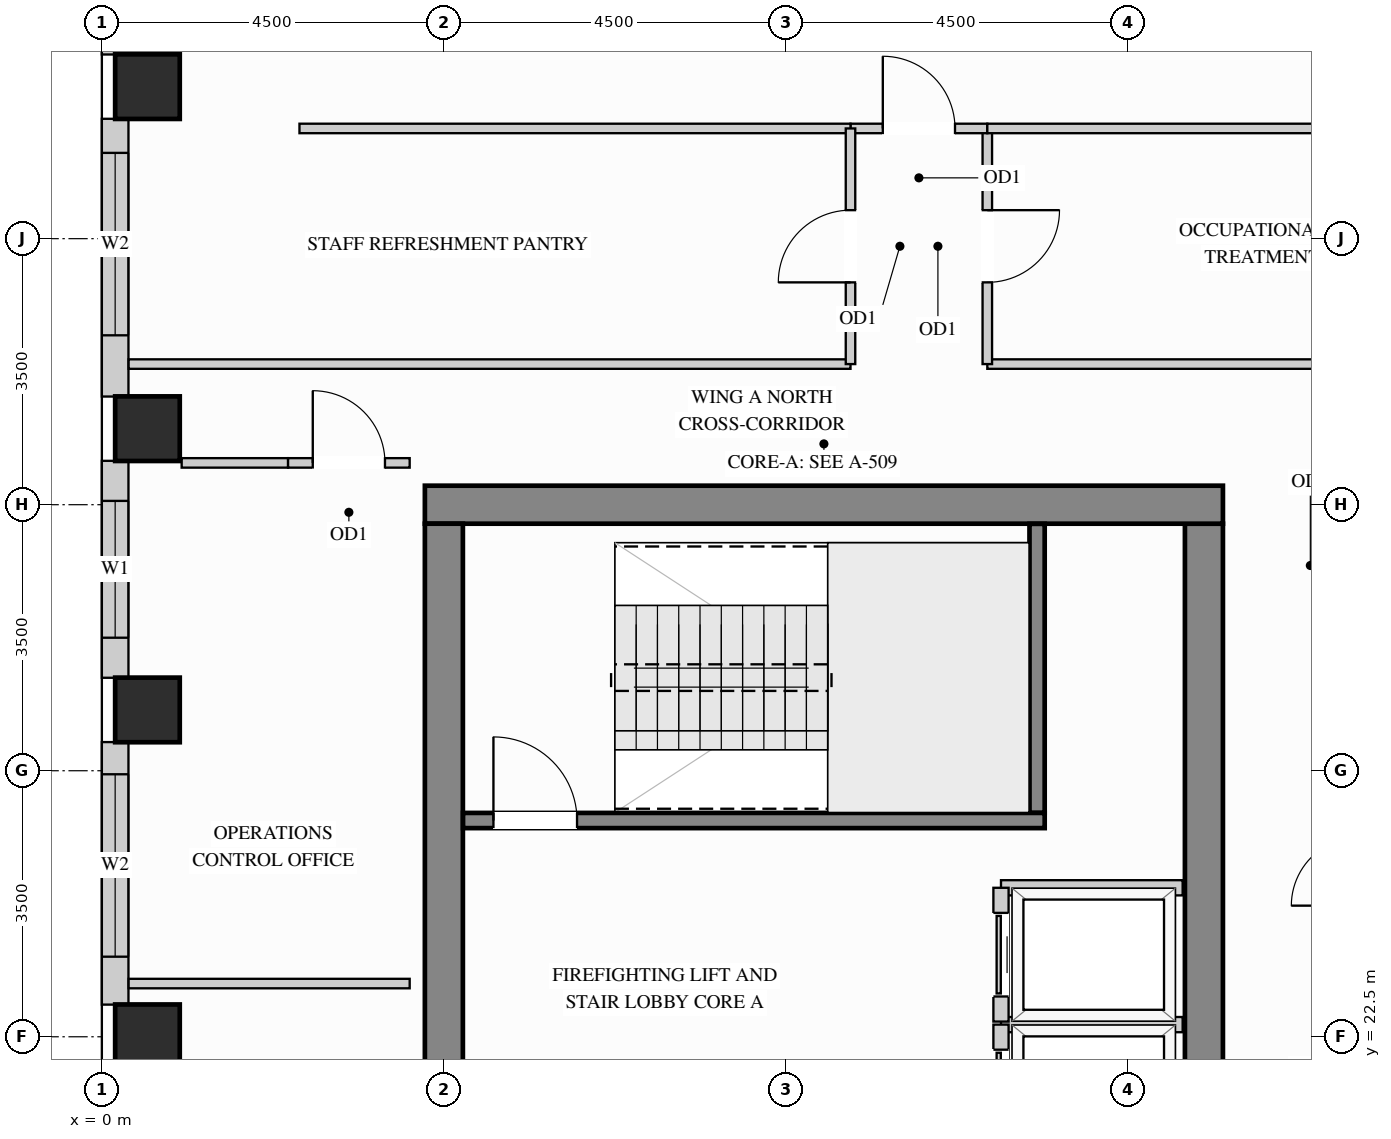
"""IFC4 building model, lengths in metres.
Left out: names, types, materials, properties, quantities, classifications, styles, units other than length and angle.
Written with IfcOpenShell. Run it as: python <this file> out.ifc"""

import sys

from ifc_helpers import new_model, si_unit, direction, frame, frame_2d, origin, origin_2d, place, context, subcontext, project, spatial, rectangle, extrude, source, transform, mapped, element, fill, save


model = new_model("IFC4")
c1 = context("Model", 3, precision=1e-05, world=origin(), true_north=direction((0.0, 1.0)))
c2 = subcontext(c1, "Body", "Model", "MODEL_VIEW")
j1 = project(units=[si_unit("LENGTHUNIT", "METRE"), si_unit("PLANEANGLEUNIT", "RADIAN")], contexts=[c1])
p1 = place(None, origin())
s1 = spatial("IfcSite", under=j1, at=p1, CompositionType="ELEMENT")
p2 = place(p1, origin())
s2 = spatial("IfcBuilding", under=s1, at=p2, CompositionType="ELEMENT")
p3 = place(p2, frame((0.0, 0.0, 226.8)))
s3 = spatial("IfcBuildingStorey", under=s2, at=p3, CompositionType="ELEMENT", Elevation=226.8)
m1 = source(origin(), c2, "Body", "SweptSolid", [
    extrude(rectangle(XDim=0.85, YDim=0.85, at=origin_2d()), origin(), (0.0, 0.0, 1.0), 3.4),
])
for number, where, z_axis, x_axis in (
    (1, (0.6, 22.5, 0.0), (0.0, 0.0, 1.0), (1.0, 0.0, 0.0)),
    (2, (0.6, 26.8, 0.0), (0.0, 0.0, 1.0), (1.0, 0.0, 0.0)),
    (3, (0.6, 30.5, 0.0), (0.0, 0.0, 1.0), (1.0, 0.0, 0.0)),
    (4, (0.6, 35.0, 0.0), (0.0, 0.0, 1.0), (1.0, 0.0, 0.0)),
):
    element("IfcColumn", number, at=place(p3, frame(where, z_axis=z_axis, x_axis=x_axis)), inside=s3, PredefinedType="COLUMN", context=c2, shape_type="MappedRepresentation", body=[
        mapped(m1, transform((0.0, 0.0, 0.0), x_axis=(1.0, 0.0, 0.0), y_axis=(0.0, 1.0, 0.0), z_axis=(0.0, 0.0, 1.0))),
    ])
m2 = source(origin(), c2, "Body", "SweptSolid", [
    extrude(rectangle(XDim=8.37, YDim=0.5, at=frame_2d((4.185, 0.0))), origin(), (0.0, 0.0, 1.0), 3.4),
])
p4 = place(p3, frame((14.5, 20.88, 0.0), z_axis=(0.0, 0.0, 1.0), x_axis=(0.0, 1.0, 0.0)))
e5 = element("IfcWall", 5, at=p4, inside=s3, PredefinedType="SHEAR", context=c2, shape_type="MappedRepresentation", body=[
    mapped(m2, transform((0.0, 0.0, 0.0), x_axis=(1.0, 0.0, 0.0), y_axis=(0.0, 1.0, 0.0), z_axis=(0.0, 0.0, 1.0))),
])
m3 = source(origin(), c2, "Body", "SweptSolid", [
    extrude(rectangle(XDim=10.5, YDim=0.5, at=frame_2d((5.25, 0.0))), origin(), (0.0, 0.0, 1.0), 3.4),
])
p5 = place(p3, frame((4.25, 29.5, 0.0), z_axis=(0.0, 0.0, 1.0), x_axis=(1.0, 0.0, 0.0)))
e6 = element("IfcWall", 6, at=p5, inside=s3, PredefinedType="SHEAR", context=c2, shape_type="MappedRepresentation", body=[
    mapped(m3, transform((0.0, 0.0, 0.0), x_axis=(1.0, 0.0, 0.0), y_axis=(0.0, 1.0, 0.0), z_axis=(0.0, 0.0, 1.0))),
])
m4 = source(origin(), c2, "Body", "SweptSolid", [
    extrude(rectangle(XDim=20.5, YDim=0.5, at=frame_2d((10.25, 0.0))), origin(), (0.0, 0.0, 1.0), 3.4),
])
p6 = place(p3, frame((4.5, 8.75, 0.0), z_axis=(0.0, 0.0, 1.0), x_axis=(0.0, 1.0, 0.0)))
e7 = element("IfcWall", 7, at=p6, inside=s3, PredefinedType="SHEAR", context=c2, shape_type="MappedRepresentation", body=[
    mapped(m4, transform((0.0, 0.0, 0.0), x_axis=(1.0, 0.0, 0.0), y_axis=(0.0, 1.0, 0.0), z_axis=(0.0, 0.0, 1.0))),
])
m5 = source(origin(), c2, "Body", "SweptSolid", [
    extrude(rectangle(XDim=0.229, YDim=0.35, at=frame_2d((0.115, 0.0))), origin(), (0.0, 0.0, 1.0), 3.385),
])
p7 = place(p3, frame((0.175, 35.652, 0.0), z_axis=(0.0, 0.0, 1.0), x_axis=(0.0, -1.0, 0.0)))
e8 = element("IfcWall", 8, at=p7, inside=s3, PredefinedType="SOLIDWALL", context=c2, shape_type="MappedRepresentation", body=[
    mapped(m5, transform((0.0, 0.0, 0.0), x_axis=(1.0, 0.0, 0.0), y_axis=(0.0, 1.0, 0.0), z_axis=(0.0, 0.0, 1.0))),
])
p8 = place(p3, frame((0.175, 34.577, 0.0), z_axis=(0.0, 0.0, 1.0), x_axis=(0.0, -1.0, 0.0)))
e9 = element("IfcWall", 9, at=p8, inside=s3, PredefinedType="SOLIDWALL", context=c2, shape_type="SweptSolid", body=[
    extrude(rectangle(XDim=3.654, YDim=0.35, at=frame_2d((1.827, 0.0))), origin(), (0.0, 0.0, 1.0), 3.385),
])
p9 = place(p8, frame((0.448, 0.0, 0.78)))
e10 = element("IfcOpeningElement", 10, at=p9, cuts=e9, PredefinedType="OPENING", context=c2, shape_type="SweptSolid", body=[
    extrude(rectangle(XDim=2.4, YDim=2.1, at=frame_2d((1.2, 1.05))), frame((0.0, 0.185, 0.0), z_axis=(0.0, -1.0, 0.0), x_axis=(1.0, 0.0, 0.0)), (0.0, 0.0, 1.0), 0.37),
])
p10 = place(p3, frame((0.175, 30.077, 0.0), z_axis=(0.0, 0.0, 1.0), x_axis=(0.0, -1.0, 0.0)))
e11 = element("IfcWall", 11, at=p10, inside=s3, PredefinedType="SOLIDWALL", context=c2, shape_type="SweptSolid", body=[
    extrude(rectangle(XDim=2.854, YDim=0.35, at=frame_2d((1.427, 0.0))), origin(), (0.0, 0.0, 1.0), 3.385),
])
p11 = place(p10, frame((0.527, 0.0, 0.78)))
e12 = element("IfcOpeningElement", 12, at=p11, cuts=e11, PredefinedType="OPENING", context=c2, shape_type="SweptSolid", body=[
    extrude(rectangle(XDim=1.8, YDim=2.1, at=frame_2d((0.9, 1.05))), frame((0.0, 0.185, 0.0), z_axis=(0.0, -1.0, 0.0), x_axis=(1.0, 0.0, 0.0)), (0.0, 0.0, 1.0), 0.37),
])
p12 = place(p3, frame((0.175, 26.377, 0.0), z_axis=(0.0, 0.0, 1.0), x_axis=(0.0, -1.0, 0.0)))
e13 = element("IfcWall", 13, at=p12, inside=s3, PredefinedType="SOLIDWALL", context=c2, shape_type="SweptSolid", body=[
    extrude(rectangle(XDim=3.454, YDim=0.35, at=frame_2d((1.727, 0.0))), origin(), (0.0, 0.0, 1.0), 3.385),
])
p13 = place(p12, frame((0.424, 0.0, 0.78)))
e14 = element("IfcOpeningElement", 14, at=p13, cuts=e13, PredefinedType="OPENING", context=c2, shape_type="SweptSolid", body=[
    extrude(rectangle(XDim=2.4, YDim=2.1, at=frame_2d((1.2, 1.05))), frame((0.0, 0.185, 0.0), z_axis=(0.0, -1.0, 0.0), x_axis=(1.0, 0.0, 0.0)), (0.0, 0.0, 1.0), 0.37),
])
m6 = source(origin(), c2, "Body", "SweptSolid", [
    extrude(rectangle(XDim=7.498, YDim=0.125, at=frame_2d((3.749, 0.0))), origin(), (0.0, 0.0, 1.0), 3.385),
])
p14 = place(p3, frame((11.65, 31.35, 0.0), z_axis=(0.0, 0.0, 1.0), x_axis=(1.0, 0.0, 0.0)))
e15 = element("IfcWall", 15, at=p14, inside=s3, PredefinedType="PARTITIONING", context=c2, shape_type="MappedRepresentation", body=[
    mapped(m6, transform((0.0, 0.0, 0.0), x_axis=(1.0, 0.0, 0.0), y_axis=(0.0, 1.0, 0.0), z_axis=(0.0, 0.0, 1.0))),
])
m7 = source(origin(), c2, "Body", "SweptSolid", [
    extrude(rectangle(XDim=9.498, YDim=0.125, at=frame_2d((4.749, 0.0))), origin(), (0.0, 0.0, 1.0), 3.385),
])
p15 = place(p3, frame((0.352, 31.35, 0.0), z_axis=(0.0, 0.0, 1.0), x_axis=(1.0, 0.0, 0.0)))
e16 = element("IfcWall", 16, at=p15, inside=s3, PredefinedType="PARTITIONING", context=c2, shape_type="MappedRepresentation", body=[
    mapped(m7, transform((0.0, 0.0, 0.0), x_axis=(1.0, 0.0, 0.0), y_axis=(0.0, 1.0, 0.0), z_axis=(0.0, 0.0, 1.0))),
])
m8 = source(origin(), c2, "Body", "SweptSolid", [
    extrude(rectangle(XDim=1.4, YDim=0.125, at=frame_2d((0.7, 0.0))), origin(), (0.0, 0.0, 1.0), 3.385),
])
p16 = place(p3, frame((1.05, 30.05, 0.0), z_axis=(0.0, 0.0, 1.0), x_axis=(1.0, 0.0, 0.0)))
e17 = element("IfcWall", 17, at=p16, inside=s3, PredefinedType="PARTITIONING", context=c2, shape_type="MappedRepresentation", body=[
    mapped(m8, transform((0.0, 0.0, 0.0), x_axis=(1.0, 0.0, 0.0), y_axis=(0.0, 1.0, 0.0), z_axis=(0.0, 0.0, 1.0))),
])
p17 = place(p3, frame((2.45, 30.05, 0.0), z_axis=(0.0, 0.0, 1.0), x_axis=(1.0, 0.0, 0.0)))
e18 = element("IfcWall", 18, at=p17, inside=s3, PredefinedType="PARTITIONING", context=c2, shape_type="SweptSolid", body=[
    extrude(rectangle(XDim=1.6, YDim=0.125, at=frame_2d((0.8, 0.0))), origin(), (0.0, 0.0, 1.0), 3.385),
])
p18 = place(p17, frame((0.325, 0.0, 0.0)))
e19 = element("IfcOpeningElement", 19, at=p18, cuts=e18, PredefinedType="OPENING", context=c2, shape_type="SweptSolid", body=[
    extrude(rectangle(XDim=0.95, YDim=2.15, at=frame_2d((0.475, 1.075))), frame((0.0, 0.073, 0.0), z_axis=(0.0, -1.0, 0.0), x_axis=(1.0, 0.0, 0.0)), (0.0, 0.0, 1.0), 0.145),
])
p19 = place(p3, frame((11.65, 31.35, 0.0), z_axis=(0.0, 0.0, 1.0), x_axis=(0.0, 1.0, 0.0)))
e20 = element("IfcWall", 20, at=p19, inside=s3, PredefinedType="PARTITIONING", context=c2, shape_type="SweptSolid", body=[
    extrude(rectangle(XDim=3.1, YDim=0.125, at=frame_2d((1.55, 0.0))), origin(), (0.0, 0.0, 1.0), 3.385),
])
p20 = place(p19, frame((1.075, 0.0, 0.0)))
e21 = element("IfcOpeningElement", 21, at=p20, cuts=e20, PredefinedType="OPENING", context=c2, shape_type="SweptSolid", body=[
    extrude(rectangle(XDim=0.95, YDim=2.15, at=frame_2d((0.475, 1.075))), frame((0.0, 0.073, 0.0), z_axis=(0.0, -1.0, 0.0), x_axis=(1.0, 0.0, 0.0)), (0.0, 0.0, 1.0), 0.145),
])
p21 = place(p3, frame((9.85, 34.45, 0.0), z_axis=(0.0, 0.0, 1.0), x_axis=(1.0, 0.0, 0.0)))
e22 = element("IfcWall", 22, at=p21, inside=s3, PredefinedType="PARTITIONING", context=c2, shape_type="SweptSolid", body=[
    extrude(rectangle(XDim=1.8, YDim=0.125, at=frame_2d((0.9, 0.0))), origin(), (0.0, 0.0, 1.0), 3.385),
])
p22 = place(p21, frame((0.425, 0.0, 0.0)))
e23 = element("IfcOpeningElement", 23, at=p22, cuts=e22, PredefinedType="OPENING", context=c2, shape_type="SweptSolid", body=[
    extrude(rectangle(XDim=0.95, YDim=2.15, at=frame_2d((0.475, 1.075))), frame((0.0, 0.073, 0.0), z_axis=(0.0, -1.0, 0.0), x_axis=(1.0, 0.0, 0.0)), (0.0, 0.0, 1.0), 0.145),
])
m9 = source(origin(), c2, "Body", "SweptSolid", [
    extrude(rectangle(XDim=5.25, YDim=0.125, at=frame_2d((2.625, 0.0))), origin(), (0.0, 0.0, 1.0), 3.385),
])
p23 = place(p3, frame((11.65, 34.45, 0.0), z_axis=(0.0, 0.0, 1.0), x_axis=(1.0, 0.0, 0.0)))
e24 = element("IfcWall", 24, at=p23, inside=s3, PredefinedType="PARTITIONING", context=c2, shape_type="MappedRepresentation", body=[
    mapped(m9, transform((0.0, 0.0, 0.0), x_axis=(1.0, 0.0, 0.0), y_axis=(0.0, 1.0, 0.0), z_axis=(0.0, 0.0, 1.0))),
])
m10 = source(origin(), c2, "Body", "SweptSolid", [
    extrude(rectangle(XDim=7.25, YDim=0.125, at=frame_2d((3.625, 0.0))), origin(), (0.0, 0.0, 1.0), 3.385),
])
p24 = place(p3, frame((2.6, 34.45, 0.0), z_axis=(0.0, 0.0, 1.0), x_axis=(1.0, 0.0, 0.0)))
e25 = element("IfcWall", 25, at=p24, inside=s3, PredefinedType="PARTITIONING", context=c2, shape_type="MappedRepresentation", body=[
    mapped(m10, transform((0.0, 0.0, 0.0), x_axis=(1.0, 0.0, 0.0), y_axis=(0.0, 1.0, 0.0), z_axis=(0.0, 0.0, 1.0))),
])
p25 = place(p3, frame((9.85, 31.35, 0.0), z_axis=(0.0, 0.0, 1.0), x_axis=(0.0, 1.0, 0.0)))
e26 = element("IfcWall", 26, at=p25, inside=s3, PredefinedType="PARTITIONING", context=c2, shape_type="SweptSolid", body=[
    extrude(rectangle(XDim=3.1, YDim=0.125, at=frame_2d((1.55, 0.0))), origin(), (0.0, 0.0, 1.0), 3.385),
])
p26 = place(p25, frame((1.075, 0.0, 0.0)))
e27 = element("IfcOpeningElement", 27, at=p26, cuts=e26, PredefinedType="OPENING", context=c2, shape_type="SweptSolid", body=[
    extrude(rectangle(XDim=0.95, YDim=2.15, at=frame_2d((0.475, 1.075))), frame((0.0, 0.073, 0.0), z_axis=(0.0, -1.0, 0.0), x_axis=(1.0, 0.0, 0.0)), (0.0, 0.0, 1.0), 0.145),
])
m11 = source(origin(), c2, "Body", "SweptSolid", [
    extrude(rectangle(XDim=3.698, YDim=0.125, at=frame_2d((1.849, 0.0))), origin(), (0.0, 0.0, 1.0), 3.385),
])
p27 = place(p3, frame((0.352, 23.2, 0.0), z_axis=(0.0, 0.0, 1.0), x_axis=(1.0, 0.0, 0.0)))
e28 = element("IfcWall", 28, at=p27, inside=s3, PredefinedType="PARTITIONING", context=c2, shape_type="MappedRepresentation", body=[
    mapped(m11, transform((0.0, 0.0, 0.0), x_axis=(1.0, 0.0, 0.0), y_axis=(0.0, 1.0, 0.0), z_axis=(0.0, 0.0, 1.0))),
])
m12 = source(origin(), c2, "Body", "SweptSolid", [
    extrude(rectangle(XDim=2.39, YDim=0.2, at=frame_2d((1.195, 0.0))), origin(), (0.0, 0.0, 1.0), 3.385),
])
p28 = place(p3, frame((11.83, 22.66, 0.0), z_axis=(0.0, 0.0, 1.0), x_axis=(1.0, 0.0, 0.0)))
e29 = element("IfcWall", 29, at=p28, inside=s3, PredefinedType="PARTITIONING", context=c2, shape_type="MappedRepresentation", body=[
    mapped(m12, transform((0.0, 0.0, 0.0), x_axis=(1.0, 0.0, 0.0), y_axis=(0.0, 1.0, 0.0), z_axis=(0.0, 0.0, 1.0))),
])
p29 = place(p3, frame((11.83, 20.9, 0.0), z_axis=(0.0, 0.0, 1.0), x_axis=(0.0, 1.0, 0.0)))
e30 = element("IfcWall", 30, at=p29, inside=s3, PredefinedType="PARTITIONING", context=c2, shape_type="SweptSolid", body=[
    extrude(rectangle(XDim=1.76, YDim=0.2, at=frame_2d((0.88, 0.0))), origin(), (0.0, 0.0, 1.0), 3.385),
])
p30 = place(p29, frame((0.33, 0.0, 0.0)))
e31 = element("IfcOpeningElement", 31, at=p30, cuts=e30, PredefinedType="OPENING", context=c2, shape_type="SweptSolid", body=[
    extrude(rectangle(XDim=1.1, YDim=2.2, at=frame_2d((0.55, 1.1))), frame((0.0, 0.11, 0.0), z_axis=(0.0, -1.0, 0.0), x_axis=(1.0, 0.0, 0.0)), (0.0, 0.0, 1.0), 0.22),
])
p31 = place(p3, frame((11.83, 24.46, 0.0), z_axis=(0.0, 0.0, 1.0), x_axis=(1.0, 0.0, 0.0)))
e32 = element("IfcWall", 32, at=p31, inside=s3, PredefinedType="PARTITIONING", context=c2, shape_type="MappedRepresentation", body=[
    mapped(m12, transform((0.0, 0.0, 0.0), x_axis=(1.0, 0.0, 0.0), y_axis=(0.0, 1.0, 0.0), z_axis=(0.0, 0.0, 1.0))),
])
p32 = place(p3, frame((11.83, 22.7, 0.0), z_axis=(0.0, 0.0, 1.0), x_axis=(0.0, 1.0, 0.0)))
e33 = element("IfcWall", 33, at=p32, inside=s3, PredefinedType="PARTITIONING", context=c2, shape_type="SweptSolid", body=[
    extrude(rectangle(XDim=1.76, YDim=0.2, at=frame_2d((0.88, 0.0))), origin(), (0.0, 0.0, 1.0), 3.385),
])
p33 = place(p32, frame((0.33, 0.0, 0.0)))
e34 = element("IfcOpeningElement", 34, at=p33, cuts=e33, PredefinedType="OPENING", context=c2, shape_type="SweptSolid", body=[
    extrude(rectangle(XDim=1.1, YDim=2.2, at=frame_2d((0.55, 1.1))), frame((0.0, 0.11, 0.0), z_axis=(0.0, -1.0, 0.0), x_axis=(1.0, 0.0, 0.0)), (0.0, 0.0, 1.0), 0.22),
])
m13 = source(origin(), c2, "Body", "SweptSolid", [
    extrude(rectangle(XDim=3.803, YDim=0.2, at=frame_2d((1.901, 0.0))), origin(), (0.0, 0.0, 1.0), 3.4),
])
p34 = place(p3, frame((12.305, 25.445, 0.0), z_axis=(0.0, 0.0, 1.0), x_axis=(0.0, 1.0, 0.0)))
e35 = element("IfcWall", 35, at=p34, inside=s3, PredefinedType="SHEAR", context=c2, shape_type="MappedRepresentation", body=[
    mapped(m13, transform((0.0, 0.0, 0.0), x_axis=(1.0, 0.0, 0.0), y_axis=(0.0, 1.0, 0.0), z_axis=(0.0, 0.0, 1.0))),
])
p35 = place(p3, frame((4.752, 25.345, 0.0), z_axis=(0.0, 0.0, 1.0), x_axis=(1.0, 0.0, 0.0)))
e36 = element("IfcWall", 36, at=p35, inside=s3, PredefinedType="SHEAR", context=c2, shape_type="SweptSolid", body=[
    extrude(rectangle(XDim=7.653, YDim=0.2, at=frame_2d((3.827, 0.0))), origin(), (0.0, 0.0, 1.0), 3.4),
])
p36 = place(p35, frame((0.4, 0.0, 0.0)))
e37 = element("IfcOpeningElement", 37, at=p36, cuts=e36, PredefinedType="OPENING", context=c2, shape_type="SweptSolid", body=[
    extrude(rectangle(XDim=1.1, YDim=2.15, at=frame_2d((0.55, 1.075))), frame((0.0, 0.11, 0.0), z_axis=(0.0, -1.0, 0.0), x_axis=(1.0, 0.0, 0.0)), (0.0, 0.0, 1.0), 0.22),
])
m14 = source(origin(), c2, "Body", "SweptSolid", [
    extrude(rectangle(XDim=1.1, YDim=2.2, at=frame_2d((0.55, 1.1))), frame((0.0, 0.025, 0.0), z_axis=(0.0, -1.0, 0.0), x_axis=(1.0, 0.0, 0.0)), (0.0, 0.0, 1.0), 0.05),
])
p37 = place(p30, origin())
e38 = element("IfcDoor", 38, at=p37, inside=s3, OperationType="SLIDING_TO_LEFT", PredefinedType="DOOR", context=c2, shape_type="MappedRepresentation", body=[
    mapped(m14, transform((0.0, 0.0, 0.0), x_axis=(1.0, 0.0, 0.0), y_axis=(0.0, 1.0, 0.0), z_axis=(0.0, 0.0, 1.0))),
])
fill(e31, e38)
p38 = place(p33, origin())
e39 = element("IfcDoor", 39, at=p38, inside=s3, OperationType="SLIDING_TO_LEFT", PredefinedType="DOOR", context=c2, shape_type="MappedRepresentation", body=[
    mapped(m14, transform((0.0, 0.0, 0.0), x_axis=(1.0, 0.0, 0.0), y_axis=(0.0, 1.0, 0.0), z_axis=(0.0, 0.0, 1.0))),
])
fill(e34, e39)
m15 = source(origin(), c2, "Body", "SweptSolid", [
    extrude(rectangle(XDim=0.95, YDim=2.15, at=frame_2d((0.475, 1.075))), frame((0.0, 0.025, 0.0), z_axis=(0.0, -1.0, 0.0), x_axis=(1.0, 0.0, 0.0)), (0.0, 0.0, 1.0), 0.05),
])
p39 = place(p20, origin())
e40 = element("IfcDoor", 40, at=p39, inside=s3, OperationType="SINGLE_SWING_RIGHT", PredefinedType="DOOR", context=c2, shape_type="MappedRepresentation", body=[
    mapped(m15, transform((0.0, 0.0, 0.0), x_axis=(1.0, 0.0, 0.0), y_axis=(0.0, 1.0, 0.0), z_axis=(0.0, 0.0, 1.0))),
])
fill(e21, e40)
p40 = place(p22, origin())
e41 = element("IfcDoor", 41, at=p40, inside=s3, OperationType="SINGLE_SWING_LEFT", PredefinedType="DOOR", context=c2, shape_type="MappedRepresentation", body=[
    mapped(m15, transform((0.0, 0.0, 0.0), x_axis=(1.0, 0.0, 0.0), y_axis=(0.0, 1.0, 0.0), z_axis=(0.0, 0.0, 1.0))),
])
fill(e23, e41)
p41 = place(p26, origin())
e42 = element("IfcDoor", 42, at=p41, inside=s3, OperationType="SINGLE_SWING_LEFT", PredefinedType="DOOR", context=c2, shape_type="MappedRepresentation", body=[
    mapped(m15, transform((0.0, 0.0, 0.0), x_axis=(1.0, 0.0, 0.0), y_axis=(0.0, 1.0, 0.0), z_axis=(0.0, 0.0, 1.0))),
])
fill(e27, e42)
p42 = place(p18, origin())
e43 = element("IfcDoor", 43, at=p42, inside=s3, OperationType="SINGLE_SWING_LEFT", PredefinedType="DOOR", context=c2, shape_type="MappedRepresentation", body=[
    mapped(m15, transform((0.0, 0.0, 0.0), x_axis=(1.0, 0.0, 0.0), y_axis=(0.0, 1.0, 0.0), z_axis=(0.0, 0.0, 1.0))),
])
fill(e19, e43)
m16 = source(origin(), c2, "Body", "SweptSolid", [
    extrude(rectangle(XDim=1.1, YDim=2.15, at=frame_2d((0.55, 1.075))), frame((0.0, 0.025, 0.0), z_axis=(0.0, -1.0, 0.0), x_axis=(1.0, 0.0, 0.0)), (0.0, 0.0, 1.0), 0.05),
])
p43 = place(p36, origin())
e44 = element("IfcDoor", 44, at=p43, inside=s3, OperationType="SINGLE_SWING_LEFT", PredefinedType="DOOR", context=c2, shape_type="MappedRepresentation", body=[
    mapped(m16, transform((0.0, 0.0, 0.0), x_axis=(1.0, 0.0, 0.0), y_axis=(0.0, 1.0, 0.0), z_axis=(0.0, 0.0, 1.0))),
])
fill(e37, e44)
m17 = source(origin(), c2, "Body", "SweptSolid", [
    extrude(rectangle(XDim=1.8, YDim=2.1, at=frame_2d((0.9, 1.05))), frame((0.0, 0.03, 0.0), z_axis=(0.0, -1.0, 0.0), x_axis=(1.0, 0.0, 0.0)), (0.0, 0.0, 1.0), 0.06),
])
p44 = place(p11, origin())
e45 = element("IfcWindow", 45, at=p44, inside=s3, PartitioningType="SINGLE_PANEL", PredefinedType="WINDOW", context=c2, shape_type="MappedRepresentation", body=[
    mapped(m17, transform((0.0, 0.0, 0.0), x_axis=(1.0, 0.0, 0.0), y_axis=(0.0, 1.0, 0.0), z_axis=(0.0, 0.0, 1.0))),
])
fill(e12, e45)
m18 = source(origin(), c2, "Body", "SweptSolid", [
    extrude(rectangle(XDim=2.4, YDim=2.1, at=frame_2d((1.2, 1.05))), frame((0.0, 0.03, 0.0), z_axis=(0.0, -1.0, 0.0), x_axis=(1.0, 0.0, 0.0)), (0.0, 0.0, 1.0), 0.06),
])
p45 = place(p9, origin())
e46 = element("IfcWindow", 46, at=p45, inside=s3, PartitioningType="SINGLE_PANEL", PredefinedType="WINDOW", context=c2, shape_type="MappedRepresentation", body=[
    mapped(m18, transform((0.0, 0.0, 0.0), x_axis=(1.0, 0.0, 0.0), y_axis=(0.0, 1.0, 0.0), z_axis=(0.0, 0.0, 1.0))),
])
fill(e10, e46)
p46 = place(p13, origin())
e47 = element("IfcWindow", 47, at=p46, inside=s3, PartitioningType="SINGLE_PANEL", PredefinedType="WINDOW", context=c2, shape_type="MappedRepresentation", body=[
    mapped(m18, transform((0.0, 0.0, 0.0), x_axis=(1.0, 0.0, 0.0), y_axis=(0.0, 1.0, 0.0), z_axis=(0.0, 0.0, 1.0))),
])
fill(e14, e47)
save(model, sys.argv[1])
